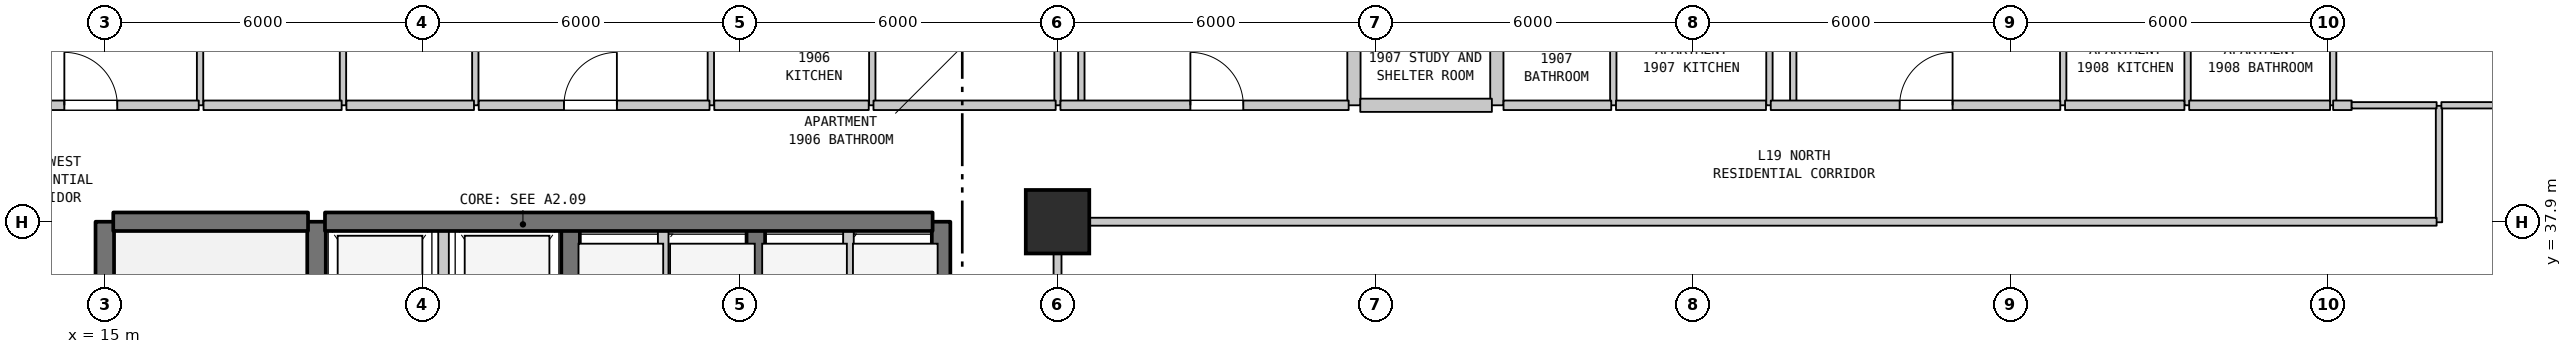
"""IFC4 building model, lengths in metres.
Left out: names, types, materials, properties, quantities, classifications, styles, units other than length and angle.
Written with IfcOpenShell. Run it as: python <this file> out.ifc"""

import sys

from ifc_helpers import new_model, si_unit, direction, frame, frame_2d, origin, origin_2d, place, context, subcontext, project, spatial, rectangle, extrude, element, fill, save


model = new_model("IFC4")
c1 = context("Model", 3, precision=1e-05, world=origin(), true_north=direction((0.0, 1.0)))
c2 = subcontext(c1, "Body", "Model", "MODEL_VIEW")
j1 = project(units=[si_unit("LENGTHUNIT", "METRE"), si_unit("PLANEANGLEUNIT", "RADIAN")], contexts=[c1])
p1 = place(None, origin())
s1 = spatial("IfcSite", under=j1, at=p1, CompositionType="ELEMENT")
p2 = place(p1, origin())
s2 = spatial("IfcBuilding", under=s1, at=p2, CompositionType="ELEMENT")
p3 = place(p2, frame((0.0, 0.0, 81.2)))
s3 = spatial("IfcBuildingStorey", under=s2, at=p3, CompositionType="ELEMENT", Elevation=81.2)
p4 = place(p3, frame((33.0, 37.9, 0.0), z_axis=(0.0, 0.0, 1.0), x_axis=(1.0, 0.0, 0.0)))
e1 = element("IfcColumn", 1, at=p4, inside=s3, PredefinedType="COLUMN", context=c2, shape_type="SweptSolid", body=[
    extrude(rectangle(XDim=1.2, YDim=1.2, at=origin_2d()), origin(), (0.0, 0.0, 1.0), 5.2),
])
p5 = place(p3, frame((15.0, 31.1, 0.0), z_axis=(0.0, 0.0, 1.0), x_axis=(0.0, 1.0, 0.0)))
e2 = element("IfcWall", 2, at=p5, inside=s3, PredefinedType="SHEAR", context=c2, shape_type="SweptSolid", body=[
    extrude(rectangle(XDim=6.8, YDim=0.35, at=frame_2d((3.4, 0.0))), origin(), (0.0, 0.0, 1.0), 4.885),
])
p6 = place(p3, frame((16.8, 40.1, 0.0), z_axis=(0.0, 0.0, 1.0), x_axis=(0.0, 1.0, 0.0)))
e3 = element("IfcWall", 3, at=p6, inside=s3, PredefinedType="PARTITIONING", context=c2, shape_type="SweptSolid", body=[
    extrude(rectangle(XDim=3.2, YDim=0.12, at=frame_2d((1.6, 0.0))), origin(), (0.0, 0.0, 1.0), 4.885),
])
p7 = place(p3, frame((19.0, 35.0, 0.0), z_axis=(0.0, 0.0, 1.0), x_axis=(0.0, 1.0, 0.0)))
e4 = element("IfcWall", 4, at=p7, inside=s3, PredefinedType="SHEAR", context=c2, shape_type="SweptSolid", body=[
    extrude(rectangle(XDim=2.9, YDim=0.35, at=frame_2d((1.45, 0.0))), origin(), (0.0, 0.0, 1.0), 4.885),
])
p8 = place(p3, frame((19.5, 40.1, 0.0), z_axis=(0.0, 0.0, 1.0), x_axis=(0.0, 1.0, 0.0)))
e5 = element("IfcWall", 5, at=p8, inside=s3, PredefinedType="PARTITIONING", context=c2, shape_type="SweptSolid", body=[
    extrude(rectangle(XDim=3.2, YDim=0.12, at=frame_2d((1.6, 0.0))), origin(), (0.0, 0.0, 1.0), 4.885),
])
p9 = place(p8, frame((1.15, 0.0, 0.0)))
e6 = element("IfcOpeningElement", 6, at=p9, cuts=e5, PredefinedType="OPENING", context=c2, shape_type="SweptSolid", body=[
    extrude(rectangle(XDim=0.9, YDim=2.15, at=frame_2d((0.45, 1.075))), frame((0.0, 0.07, 0.0), z_axis=(0.0, -1.0, 0.0), x_axis=(1.0, 0.0, 0.0)), (0.0, 0.0, 1.0), 0.14),
])
p10 = place(p3, frame((21.4, 35.0, 0.0), z_axis=(0.0, 0.0, 1.0), x_axis=(0.0, 1.0, 0.0)))
e7 = element("IfcWall", 7, at=p10, inside=s3, PredefinedType="STANDARD", context=c2, shape_type="SweptSolid", body=[
    extrude(rectangle(XDim=2.9, YDim=0.2, at=frame_2d((1.45, 0.0))), origin(), (0.0, 0.0, 1.0), 4.885),
])
p11 = place(p3, frame((22.0, 40.1, 0.0), z_axis=(0.0, 0.0, 1.0), x_axis=(0.0, 1.0, 0.0)))
e8 = element("IfcWall", 8, at=p11, inside=s3, PredefinedType="PARTITIONING", context=c2, shape_type="SweptSolid", body=[
    extrude(rectangle(XDim=13.79, YDim=0.12, at=frame_2d((6.895, 0.0))), origin(), (0.0, 0.0, 1.0), 4.885),
])
p12 = place(p3, frame((23.8, 35.0, 0.0), z_axis=(0.0, 0.0, 1.0), x_axis=(0.0, 1.0, 0.0)))
e9 = element("IfcWall", 9, at=p12, inside=s3, PredefinedType="SHEAR", context=c2, shape_type="SweptSolid", body=[
    extrude(rectangle(XDim=2.9, YDim=0.35, at=frame_2d((1.45, 0.0))), origin(), (0.0, 0.0, 1.0), 4.885),
])
p13 = place(p3, frame((25.55, 35.0, 0.0), z_axis=(0.0, 0.0, 1.0), x_axis=(0.0, 1.0, 0.0)))
e10 = element("IfcWall", 10, at=p13, inside=s3, PredefinedType="STANDARD", context=c2, shape_type="SweptSolid", body=[
    extrude(rectangle(XDim=2.9, YDim=0.2, at=frame_2d((1.45, 0.0))), origin(), (0.0, 0.0, 1.0), 4.885),
])
p14 = place(p3, frame((26.45, 40.1, 0.0), z_axis=(0.0, 0.0, 1.0), x_axis=(0.0, 1.0, 0.0)))
e11 = element("IfcWall", 11, at=p14, inside=s3, PredefinedType="PARTITIONING", context=c2, shape_type="SweptSolid", body=[
    extrude(rectangle(XDim=2.3, YDim=0.12, at=frame_2d((1.15, 0.0))), origin(), (0.0, 0.0, 1.0), 4.885),
])
p15 = place(p3, frame((27.3, 35.0, 0.0), z_axis=(0.0, 0.0, 1.0), x_axis=(0.0, 1.0, 0.0)))
e12 = element("IfcWall", 12, at=p15, inside=s3, PredefinedType="SHEAR", context=c2, shape_type="SweptSolid", body=[
    extrude(rectangle(XDim=2.9, YDim=0.35, at=frame_2d((1.45, 0.0))), origin(), (0.0, 0.0, 1.0), 4.885),
])
p16 = place(p3, frame((29.05, 35.0, 0.0), z_axis=(0.0, 0.0, 1.0), x_axis=(0.0, 1.0, 0.0)))
e13 = element("IfcWall", 13, at=p16, inside=s3, PredefinedType="STANDARD", context=c2, shape_type="SweptSolid", body=[
    extrude(rectangle(XDim=2.9, YDim=0.2, at=frame_2d((1.45, 0.0))), origin(), (0.0, 0.0, 1.0), 4.885),
])
p17 = place(p3, frame((29.5, 40.1, 0.0), z_axis=(0.0, 0.0, 1.0), x_axis=(0.0, 1.0, 0.0)))
e14 = element("IfcWall", 14, at=p17, inside=s3, PredefinedType="PARTITIONING", context=c2, shape_type="SweptSolid", body=[
    extrude(rectangle(XDim=2.3, YDim=0.12, at=frame_2d((1.15, 0.0))), origin(), (0.0, 0.0, 1.0), 4.885),
])
p18 = place(p3, frame((30.8, 35.0, 0.0), z_axis=(0.0, 0.0, 1.0), x_axis=(0.0, 1.0, 0.0)))
e15 = element("IfcWall", 15, at=p18, inside=s3, PredefinedType="SHEAR", context=c2, shape_type="SweptSolid", body=[
    extrude(rectangle(XDim=2.9, YDim=0.35, at=frame_2d((1.45, 0.0))), origin(), (0.0, 0.0, 1.0), 4.885),
])
p19 = place(p3, frame((33.0, 27.91, 0.0), z_axis=(0.0, 0.0, 1.0), x_axis=(0.0, 1.0, 0.0)))
e16 = element("IfcWall", 16, at=p19, inside=s3, PredefinedType="STANDARD", context=c2, shape_type="SweptSolid", body=[
    extrude(rectangle(XDim=9.98, YDim=0.15, at=frame_2d((4.99, 0.0))), origin(), (0.0, 0.0, 1.0), 4.385),
])
p20 = place(p3, frame((33.0, 40.1, 0.0), z_axis=(0.0, 0.0, 1.0), x_axis=(0.0, 1.0, 0.0)))
e17 = element("IfcWall", 17, at=p20, inside=s3, PredefinedType="PARTITIONING", context=c2, shape_type="SweptSolid", body=[
    extrude(rectangle(XDim=2.3, YDim=0.12, at=frame_2d((1.15, 0.0))), origin(), (0.0, 0.0, 1.0), 4.285),
])
p21 = place(p3, frame((33.45, 40.1, 0.0), z_axis=(0.0, 0.0, 1.0), x_axis=(0.0, 1.0, 0.0)))
e18 = element("IfcWall", 18, at=p21, inside=s3, PredefinedType="PARTITIONING", context=c2, shape_type="SweptSolid", body=[
    extrude(rectangle(XDim=1.95, YDim=0.12, at=frame_2d((0.975, 0.0))), origin(), (0.0, 0.0, 1.0), 4.885),
])
for number, where, z_axis, x_axis in (
    (19, (38.6, 40.1, 0.0), (0.0, 0.0, 1.0), (0.0, 1.0, 0.0)),
    (20, (41.3, 40.1, 0.0), (0.0, 0.0, 1.0), (0.0, 1.0, 0.0)),
):
    element("IfcWall", number, at=place(p3, frame(where, z_axis=z_axis, x_axis=x_axis)), inside=s3, PredefinedType="STANDARD", context=c2, shape_type="SweptSolid", body=[
        extrude(rectangle(XDim=2.3, YDim=0.25, at=frame_2d((1.15, 0.0))), origin(), (0.0, 0.0, 1.0), 4.885),
    ])
for number, where, z_axis, x_axis in (
    (21, (43.5, 40.1, 0.0), (0.0, 0.0, 1.0), (0.0, 1.0, 0.0)),
    (22, (46.45, 40.1, 0.0), (0.0, 0.0, 1.0), (0.0, 1.0, 0.0)),
):
    element("IfcWall", number, at=place(p3, frame(where, z_axis=z_axis, x_axis=x_axis)), inside=s3, PredefinedType="PARTITIONING", context=c2, shape_type="SweptSolid", body=[
        extrude(rectangle(XDim=2.3, YDim=0.12, at=frame_2d((1.15, 0.0))), origin(), (0.0, 0.0, 1.0), 4.885),
    ])
p22 = place(p3, frame((46.9, 40.1, 0.0), z_axis=(0.0, 0.0, 1.0), x_axis=(0.0, 1.0, 0.0)))
e23 = element("IfcWall", 23, at=p22, inside=s3, PredefinedType="PARTITIONING", context=c2, shape_type="SweptSolid", body=[
    extrude(rectangle(XDim=13.79, YDim=0.12, at=frame_2d((6.895, 0.0))), origin(), (0.0, 0.0, 1.0), 4.885),
])
for number, where, z_axis, x_axis in (
    (24, (52.0, 40.1, 0.0), (0.0, 0.0, 1.0), (0.0, 1.0, 0.0)),
    (25, (54.35, 40.1, 0.0), (0.0, 0.0, 1.0), (0.0, 1.0, 0.0)),
    (26, (57.1, 40.1, 0.0), (0.0, 0.0, 1.0), (0.0, 1.0, 0.0)),
):
    element("IfcWall", number, at=place(p3, frame(where, z_axis=z_axis, x_axis=x_axis)), inside=s3, PredefinedType="PARTITIONING", context=c2, shape_type="SweptSolid", body=[
        extrude(rectangle(XDim=2.3, YDim=0.12, at=frame_2d((1.15, 0.0))), origin(), (0.0, 0.0, 1.0), 4.885),
    ])
p23 = place(p3, frame((59.1, 37.89, 0.0), z_axis=(0.0, 0.0, 1.0), x_axis=(0.0, 1.0, 0.0)))
e27 = element("IfcWall", 27, at=p23, inside=s3, PredefinedType="PARTITIONING", context=c2, shape_type="SweptSolid", body=[
    extrude(rectangle(XDim=2.2, YDim=0.12, at=frame_2d((1.1, 0.0))), origin(), (0.0, 0.0, 1.0), 4.885),
])
p24 = place(p3, frame((15.16, 37.9, 0.0), z_axis=(0.0, 0.0, 1.0), x_axis=(1.0, 0.0, 0.0)))
e28 = element("IfcWall", 28, at=p24, inside=s3, PredefinedType="SHEAR", context=c2, shape_type="SweptSolid", body=[
    extrude(rectangle(XDim=3.68, YDim=0.35, at=frame_2d((1.84, 0.0))), origin(), (0.0, 0.0, 1.0), 4.885),
])
p25 = place(p3, frame((19.16, 37.9, 0.0), z_axis=(0.0, 0.0, 1.0), x_axis=(1.0, 0.0, 0.0)))
e29 = element("IfcWall", 29, at=p25, inside=s3, PredefinedType="SHEAR", context=c2, shape_type="SweptSolid", body=[
    extrude(rectangle(XDim=11.48, YDim=0.35, at=frame_2d((5.74, 0.0))), origin(), (0.0, 0.0, 1.0), 4.885),
])
p26 = place(p3, frame((33.07, 37.9, 0.0), z_axis=(0.0, 0.0, 1.0), x_axis=(1.0, 0.0, 0.0)))
e30 = element("IfcWall", 30, at=p26, inside=s3, PredefinedType="STANDARD", context=c2, shape_type="SweptSolid", body=[
    extrude(rectangle(XDim=25.985, YDim=0.15, at=frame_2d((12.992, 0.0))), origin(), (0.0, 0.0, 1.0), 4.885),
])
p27 = place(p3, frame((12.875, 40.1, 0.0), z_axis=(0.0, 0.0, 1.0), x_axis=(1.0, 0.0, 0.0)))
e31 = element("IfcWall", 31, at=p27, inside=s3, PredefinedType="STANDARD", context=c2, shape_type="SweptSolid", body=[
    extrude(rectangle(XDim=3.9, YDim=0.18, at=frame_2d((1.95, 0.0))), origin(), (0.0, 0.0, 1.0), 4.885),
])
p28 = place(p27, frame((1.361, 0.0, 0.0)))
e32 = element("IfcOpeningElement", 32, at=p28, cuts=e31, PredefinedType="OPENING", context=c2, shape_type="SweptSolid", body=[
    extrude(rectangle(XDim=1.0, YDim=2.15, at=frame_2d((0.5, 1.075))), frame((0.0, 0.1, 0.0), z_axis=(0.0, -1.0, 0.0), x_axis=(1.0, 0.0, 0.0)), (0.0, 0.0, 1.0), 0.2),
])
p29 = place(p3, frame((16.865, 40.1, 0.0), z_axis=(0.0, 0.0, 1.0), x_axis=(1.0, 0.0, 0.0)))
e33 = element("IfcWall", 33, at=p29, inside=s3, PredefinedType="STANDARD", context=c2, shape_type="SweptSolid", body=[
    extrude(rectangle(XDim=2.61, YDim=0.18, at=frame_2d((1.305, 0.0))), origin(), (0.0, 0.0, 1.0), 4.885),
])
p30 = place(p3, frame((19.565, 40.1, 0.0), z_axis=(0.0, 0.0, 1.0), x_axis=(1.0, 0.0, 0.0)))
e34 = element("IfcWall", 34, at=p30, inside=s3, PredefinedType="STANDARD", context=c2, shape_type="SweptSolid", body=[
    extrude(rectangle(XDim=2.41, YDim=0.18, at=frame_2d((1.205, 0.0))), origin(), (0.0, 0.0, 1.0), 4.885),
])
p31 = place(p3, frame((22.065, 40.1, 0.0), z_axis=(0.0, 0.0, 1.0), x_axis=(1.0, 0.0, 0.0)))
e35 = element("IfcWall", 35, at=p31, inside=s3, PredefinedType="STANDARD", context=c2, shape_type="SweptSolid", body=[
    extrude(rectangle(XDim=4.36, YDim=0.18, at=frame_2d((2.18, 0.0))), origin(), (0.0, 0.0, 1.0), 4.885),
])
p32 = place(p31, frame((1.61, 0.0, 0.0)))
e36 = element("IfcOpeningElement", 36, at=p32, cuts=e35, PredefinedType="OPENING", context=c2, shape_type="SweptSolid", body=[
    extrude(rectangle(XDim=1.0, YDim=2.15, at=frame_2d((0.5, 1.075))), frame((0.0, 0.1, 0.0), z_axis=(0.0, -1.0, 0.0), x_axis=(1.0, 0.0, 0.0)), (0.0, 0.0, 1.0), 0.2),
])
p33 = place(p3, frame((26.515, 40.1, 0.0), z_axis=(0.0, 0.0, 1.0), x_axis=(1.0, 0.0, 0.0)))
e37 = element("IfcWall", 37, at=p33, inside=s3, PredefinedType="STANDARD", context=c2, shape_type="SweptSolid", body=[
    extrude(rectangle(XDim=2.918, YDim=0.18, at=frame_2d((1.459, 0.0))), origin(), (0.0, 0.0, 1.0), 4.885),
])
p34 = place(p3, frame((29.523, 40.1, 0.0), z_axis=(0.0, 0.0, 1.0), x_axis=(1.0, 0.0, 0.0)))
e38 = element("IfcWall", 38, at=p34, inside=s3, PredefinedType="STANDARD", context=c2, shape_type="SweptSolid", body=[
    extrude(rectangle(XDim=3.442, YDim=0.18, at=frame_2d((1.721, 0.0))), origin(), (0.0, 0.0, 1.0), 4.885),
])
p35 = place(p3, frame((33.055, 40.1, 0.0), z_axis=(0.0, 0.0, 1.0), x_axis=(1.0, 0.0, 0.0)))
e39 = element("IfcWall", 39, at=p35, inside=s3, PredefinedType="STANDARD", context=c2, shape_type="SweptSolid", body=[
    extrude(rectangle(XDim=5.445, YDim=0.18, at=frame_2d((2.723, 0.0))), origin(), (0.0, 0.0, 1.0), 4.885),
])
p36 = place(p35, frame((2.455, 0.0, 0.0)))
e40 = element("IfcOpeningElement", 40, at=p36, cuts=e39, PredefinedType="OPENING", context=c2, shape_type="SweptSolid", body=[
    extrude(rectangle(XDim=1.0, YDim=2.15, at=frame_2d((0.5, 1.075))), frame((0.0, 0.1, 0.0), z_axis=(0.0, -1.0, 0.0), x_axis=(1.0, 0.0, 0.0)), (0.0, 0.0, 1.0), 0.2),
])
p37 = place(p3, frame((38.72, 40.1, 0.0), z_axis=(0.0, 0.0, 1.0), x_axis=(1.0, 0.0, 0.0)))
e41 = element("IfcWall", 41, at=p37, inside=s3, PredefinedType="STANDARD", context=c2, shape_type="SweptSolid", body=[
    extrude(rectangle(XDim=2.486, YDim=0.25, at=frame_2d((1.243, 0.0))), origin(), (0.0, 0.0, 1.0), 4.885),
])
p38 = place(p3, frame((41.426, 40.1, 0.0), z_axis=(0.0, 0.0, 1.0), x_axis=(1.0, 0.0, 0.0)))
e42 = element("IfcWall", 42, at=p38, inside=s3, PredefinedType="STANDARD", context=c2, shape_type="SweptSolid", body=[
    extrude(rectangle(XDim=2.035, YDim=0.18, at=frame_2d((1.018, 0.0))), origin(), (0.0, 0.0, 1.0), 4.885),
])
p39 = place(p3, frame((43.551, 40.1, 0.0), z_axis=(0.0, 0.0, 1.0), x_axis=(1.0, 0.0, 0.0)))
e43 = element("IfcWall", 43, at=p39, inside=s3, PredefinedType="STANDARD", context=c2, shape_type="SweptSolid", body=[
    extrude(rectangle(XDim=2.834, YDim=0.18, at=frame_2d((1.417, 0.0))), origin(), (0.0, 0.0, 1.0), 4.885),
])
p40 = place(p3, frame((46.475, 40.1, 0.0), z_axis=(0.0, 0.0, 1.0), x_axis=(1.0, 0.0, 0.0)))
e44 = element("IfcWall", 44, at=p40, inside=s3, PredefinedType="STANDARD", context=c2, shape_type="SweptSolid", body=[
    extrude(rectangle(XDim=5.47, YDim=0.18, at=frame_2d((2.735, 0.0))), origin(), (0.0, 0.0, 1.0), 4.885),
])
p41 = place(p40, frame((2.435, 0.0, 0.0)))
e45 = element("IfcOpeningElement", 45, at=p41, cuts=e44, PredefinedType="OPENING", context=c2, shape_type="SweptSolid", body=[
    extrude(rectangle(XDim=1.0, YDim=2.15, at=frame_2d((0.5, 1.075))), frame((0.0, 0.1, 0.0), z_axis=(0.0, -1.0, 0.0), x_axis=(1.0, 0.0, 0.0)), (0.0, 0.0, 1.0), 0.2),
])
p42 = place(p3, frame((52.035, 40.1, 0.0), z_axis=(0.0, 0.0, 1.0), x_axis=(1.0, 0.0, 0.0)))
e46 = element("IfcWall", 46, at=p42, inside=s3, PredefinedType="STANDARD", context=c2, shape_type="SweptSolid", body=[
    extrude(rectangle(XDim=2.255, YDim=0.18, at=frame_2d((1.127, 0.0))), origin(), (0.0, 0.0, 1.0), 4.885),
])
p43 = place(p3, frame((54.38, 40.1, 0.0), z_axis=(0.0, 0.0, 1.0), x_axis=(1.0, 0.0, 0.0)))
e47 = element("IfcWall", 47, at=p43, inside=s3, PredefinedType="STANDARD", context=c2, shape_type="SweptSolid", body=[
    extrude(rectangle(XDim=2.662, YDim=0.18, at=frame_2d((1.331, 0.0))), origin(), (0.0, 0.0, 1.0), 4.885),
])
p44 = place(p3, frame((57.1, 40.1, 0.0), z_axis=(0.0, 0.0, 1.0), x_axis=(1.0, 0.0, 0.0)))
e48 = element("IfcWall", 48, at=p44, inside=s3, PredefinedType="STANDARD", context=c2, shape_type="SweptSolid", body=[
    extrude(rectangle(XDim=0.35, YDim=0.18, at=frame_2d((0.175, 0.0))), origin(), (0.0, 0.0, 1.0), 4.885),
])
p45 = place(p3, frame((57.45, 40.1, 0.0), z_axis=(0.0, 0.0, 1.0), x_axis=(1.0, 0.0, 0.0)))
e49 = element("IfcWall", 49, at=p45, inside=s3, PredefinedType="PARTITIONING", context=c2, shape_type="SweptSolid", body=[
    extrude(rectangle(XDim=1.605, YDim=0.12, at=frame_2d((0.802, 0.0))), origin(), (0.0, 0.0, 1.0), 4.885),
])
p46 = place(p3, frame((59.145, 40.1, 0.0), z_axis=(0.0, 0.0, 1.0), x_axis=(1.0, 0.0, 0.0)))
e50 = element("IfcWall", 50, at=p46, inside=s3, PredefinedType="PARTITIONING", context=c2, shape_type="SweptSolid", body=[
    extrude(rectangle(XDim=1.055, YDim=0.12, at=frame_2d((0.527, 0.0))), origin(), (0.0, 0.0, 1.0), 4.885),
])
p47 = place(p28, origin())
e51 = element("IfcDoor", 51, at=p47, inside=s3, OperationType="SINGLE_SWING_LEFT", PredefinedType="DOOR", context=c2, shape_type="SweptSolid", body=[
    extrude(rectangle(XDim=1.0, YDim=2.15, at=frame_2d((0.5, 1.075))), frame((0.0, 0.025, 0.0), z_axis=(0.0, -1.0, 0.0), x_axis=(1.0, 0.0, 0.0)), (0.0, 0.0, 1.0), 0.05),
])
fill(e32, e51)
p48 = place(p32, origin())
e52 = element("IfcDoor", 52, at=p48, inside=s3, OperationType="SINGLE_SWING_RIGHT", PredefinedType="DOOR", context=c2, shape_type="SweptSolid", body=[
    extrude(rectangle(XDim=1.0, YDim=2.15, at=frame_2d((0.5, 1.075))), frame((0.0, 0.025, 0.0), z_axis=(0.0, -1.0, 0.0), x_axis=(1.0, 0.0, 0.0)), (0.0, 0.0, 1.0), 0.05),
])
fill(e36, e52)
p49 = place(p36, origin())
e53 = element("IfcDoor", 53, at=p49, inside=s3, OperationType="SINGLE_SWING_LEFT", PredefinedType="DOOR", context=c2, shape_type="SweptSolid", body=[
    extrude(rectangle(XDim=1.0, YDim=2.15, at=frame_2d((0.5, 1.075))), frame((0.0, 0.025, 0.0), z_axis=(0.0, -1.0, 0.0), x_axis=(1.0, 0.0, 0.0)), (0.0, 0.0, 1.0), 0.05),
])
fill(e40, e53)
p50 = place(p41, origin())
e54 = element("IfcDoor", 54, at=p50, inside=s3, OperationType="SINGLE_SWING_RIGHT", PredefinedType="DOOR", context=c2, shape_type="SweptSolid", body=[
    extrude(rectangle(XDim=1.0, YDim=2.15, at=frame_2d((0.5, 1.075))), frame((0.0, 0.025, 0.0), z_axis=(0.0, -1.0, 0.0), x_axis=(1.0, 0.0, 0.0)), (0.0, 0.0, 1.0), 0.05),
])
fill(e45, e54)
save(model, sys.argv[1])
